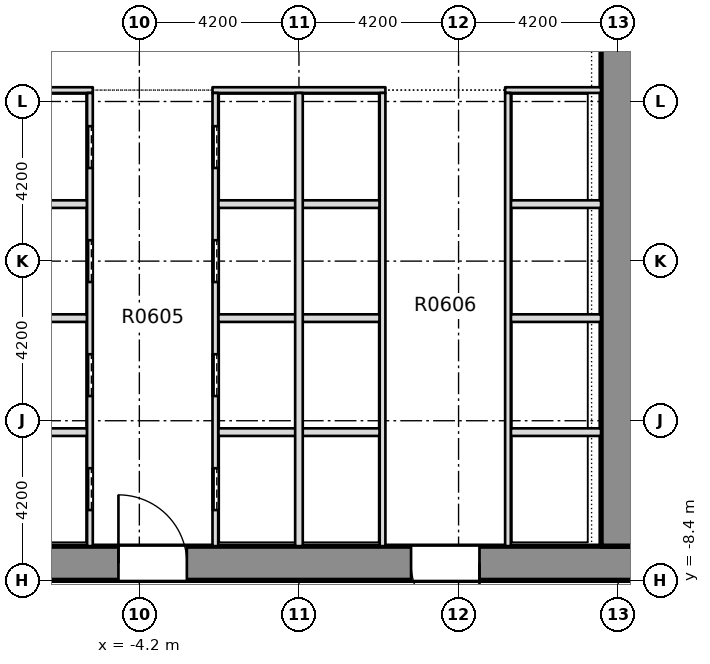
"""IFC4 building model, lengths in metres.
Left out: names, types, materials, properties, quantities, classifications, styles, units other than length and angle.
Written with IfcOpenShell. Run it as: python <this file> out.ifc"""

import sys

from ifc_helpers import new_model, si_unit, direction, frame, frame_2d, origin, place, context, subcontext, project, spatial, rectangle, extrude, element, fill, save


model = new_model("IFC4")
c1 = context("Model", 3, precision=1e-05, world=origin(), true_north=direction((0.0, 1.0)))
c2 = subcontext(c1, "Body", "Model", "MODEL_VIEW")
j1 = project(units=[si_unit("LENGTHUNIT", "METRE"), si_unit("PLANEANGLEUNIT", "RADIAN")], contexts=[c1])
p1 = place(None, origin())
s1 = spatial("IfcSite", under=j1, at=p1, CompositionType="ELEMENT")
p2 = place(p1, origin())
s2 = spatial("IfcBuilding", under=s1, at=p2, CompositionType="ELEMENT")
p3 = place(p2, frame((0.0, 0.0, 34.5)))
s3 = spatial("IfcBuildingStorey", under=s2, at=p3, CompositionType="ELEMENT", Elevation=34.5)
p4 = place(p3, frame((-11.7, -7.95, -0.32), z_axis=(0.0, 0.0, 1.0), x_axis=(1.0, 0.0, 0.0)))
e1 = element("IfcWall", 1, at=p4, inside=s3, PredefinedType="SHEAR", context=c2, shape_type="SweptSolid", body=[
    extrude(rectangle(XDim=23.4, YDim=0.9, at=frame_2d((11.7, 0.0))), origin(), (0.0, 0.0, 1.0), 3.45),
])
p5 = place(p4, frame((6.95, 0.0, 0.32)))
e2 = element("IfcOpeningElement", 2, at=p5, cuts=e1, PredefinedType="OPENING", context=c2, shape_type="SweptSolid", body=[
    extrude(rectangle(XDim=1.8, YDim=2.1, at=frame_2d((0.9, 1.05))), frame((0.0, 0.46, 0.0), z_axis=(0.0, -1.0, 0.0), x_axis=(1.0, 0.0, 0.0)), (0.0, 0.0, 1.0), 0.92),
])
p6 = place(p4, frame((14.65, 0.0, 0.32)))
e3 = element("IfcOpeningElement", 3, at=p6, cuts=e1, PredefinedType="OPENING", context=c2, shape_type="SweptSolid", body=[
    extrude(rectangle(XDim=1.8, YDim=2.1, at=frame_2d((0.9, 1.05))), frame((0.0, 0.46, 0.0), z_axis=(0.0, -1.0, 0.0), x_axis=(1.0, 0.0, 0.0)), (0.0, 0.0, 1.0), 0.92),
])
p7 = place(p3, frame((8.4, -7.5, -0.32), z_axis=(0.0, 0.0, 1.0), x_axis=(0.0, 1.0, 0.0)))
e4 = element("IfcWall", 4, at=p7, inside=s3, PredefinedType="SHEAR", context=c2, shape_type="SweptSolid", body=[
    extrude(rectangle(XDim=28.35, YDim=0.9, at=frame_2d((14.175, 0.0))), origin(), (0.0, 0.0, 1.0), 3.45),
])
p8 = place(p7, frame((18.4, 0.0, 0.32)))
e5 = element("IfcOpeningElement", 5, at=p8, cuts=e4, PredefinedType="OPENING", context=c2, shape_type="SweptSolid", body=[
    extrude(rectangle(XDim=1.2, YDim=2.1, at=frame_2d((0.6, 1.05))), frame((0.0, 0.46, 0.0), z_axis=(0.0, -1.0, 0.0), x_axis=(1.0, 0.0, 0.0)), (0.0, 0.0, 1.0), 0.92),
])
p9 = place(p3, frame((-7.949, -4.5, 0.0), z_axis=(0.0, 0.0, 1.0), x_axis=(1.0, 0.0, 0.0)))
e6 = element("IfcWall", 6, at=p9, inside=s3, PredefinedType="PARTITIONING", context=c2, shape_type="SweptSolid", body=[
    extrude(rectangle(XDim=2.374, YDim=0.2, at=frame_2d((1.187, 0.0))), origin(), (0.0, 0.0, 1.0), 3.13),
])
p10 = place(p3, frame((-2.125, -4.5, 0.0), z_axis=(0.0, 0.0, 1.0), x_axis=(1.0, 0.0, 0.0)))
e7 = element("IfcWall", 7, at=p10, inside=s3, PredefinedType="PARTITIONING", context=c2, shape_type="SweptSolid", body=[
    extrude(rectangle(XDim=4.25, YDim=0.2, at=frame_2d((2.125, 0.0))), origin(), (0.0, 0.0, 1.0), 3.13),
])
for number, where, z_axis, x_axis in (
    (8, (5.575, -4.5, 0.0), (0.0, 0.0, 1.0), (1.0, 0.0, 0.0)),
    (9, (-7.949, -1.5, 0.0), (0.0, 0.0, 1.0), (1.0, 0.0, 0.0)),
):
    element("IfcWall", number, at=place(p3, frame(where, z_axis=z_axis, x_axis=x_axis)), inside=s3, PredefinedType="PARTITIONING", context=c2, shape_type="SweptSolid", body=[
        extrude(rectangle(XDim=2.374, YDim=0.2, at=frame_2d((1.187, 0.0))), origin(), (0.0, 0.0, 1.0), 3.13),
    ])
p11 = place(p3, frame((-2.125, -1.5, 0.0), z_axis=(0.0, 0.0, 1.0), x_axis=(1.0, 0.0, 0.0)))
e10 = element("IfcWall", 10, at=p11, inside=s3, PredefinedType="PARTITIONING", context=c2, shape_type="SweptSolid", body=[
    extrude(rectangle(XDim=4.25, YDim=0.2, at=frame_2d((2.125, 0.0))), origin(), (0.0, 0.0, 1.0), 3.13),
])
for number, where, z_axis, x_axis in (
    (11, (5.575, -1.5, 0.0), (0.0, 0.0, 1.0), (1.0, 0.0, 0.0)),
    (12, (-7.949, 1.5, 0.0), (0.0, 0.0, 1.0), (1.0, 0.0, 0.0)),
):
    element("IfcWall", number, at=place(p3, frame(where, z_axis=z_axis, x_axis=x_axis)), inside=s3, PredefinedType="PARTITIONING", context=c2, shape_type="SweptSolid", body=[
        extrude(rectangle(XDim=2.374, YDim=0.2, at=frame_2d((1.187, 0.0))), origin(), (0.0, 0.0, 1.0), 3.13),
    ])
p12 = place(p3, frame((-2.125, 1.5, 0.0), z_axis=(0.0, 0.0, 1.0), x_axis=(1.0, 0.0, 0.0)))
e13 = element("IfcWall", 13, at=p12, inside=s3, PredefinedType="PARTITIONING", context=c2, shape_type="SweptSolid", body=[
    extrude(rectangle(XDim=4.25, YDim=0.2, at=frame_2d((2.125, 0.0))), origin(), (0.0, 0.0, 1.0), 3.13),
])
p13 = place(p3, frame((5.575, 1.5, 0.0), z_axis=(0.0, 0.0, 1.0), x_axis=(1.0, 0.0, 0.0)))
e14 = element("IfcWall", 14, at=p13, inside=s3, PredefinedType="PARTITIONING", context=c2, shape_type="SweptSolid", body=[
    extrude(rectangle(XDim=2.374, YDim=0.2, at=frame_2d((1.187, 0.0))), origin(), (0.0, 0.0, 1.0), 3.13),
])
p14 = place(p3, frame((-7.949, 4.5, 0.0), z_axis=(0.0, 0.0, 1.0), x_axis=(1.0, 0.0, 0.0)))
e15 = element("IfcWall", 15, at=p14, inside=s3, PredefinedType="PARTITIONING", context=c2, shape_type="SweptSolid", body=[
    extrude(rectangle(XDim=2.524, YDim=0.15, at=frame_2d((1.262, 0.0))), origin(), (0.0, 0.0, 1.0), 3.13),
])
p15 = place(p3, frame((-2.275, 4.5, 0.0), z_axis=(0.0, 0.0, 1.0), x_axis=(1.0, 0.0, 0.0)))
e16 = element("IfcWall", 16, at=p15, inside=s3, PredefinedType="PARTITIONING", context=c2, shape_type="SweptSolid", body=[
    extrude(rectangle(XDim=4.55, YDim=0.15, at=frame_2d((2.275, 0.0))), origin(), (0.0, 0.0, 1.0), 3.13),
])
p16 = place(p3, frame((5.425, 4.5, 0.0), z_axis=(0.0, 0.0, 1.0), x_axis=(1.0, 0.0, 0.0)))
e17 = element("IfcWall", 17, at=p16, inside=s3, PredefinedType="PARTITIONING", context=c2, shape_type="SweptSolid", body=[
    extrude(rectangle(XDim=2.524, YDim=0.15, at=frame_2d((1.262, 0.0))), origin(), (0.0, 0.0, 1.0), 3.13),
])
p17 = place(p3, frame((-5.5, -7.499, 0.0), z_axis=(0.0, 0.0, 1.0), x_axis=(0.0, 1.0, 0.0)))
e18 = element("IfcWall", 18, at=p17, inside=s3, PredefinedType="PARTITIONING", context=c2, shape_type="SweptSolid", body=[
    extrude(rectangle(XDim=11.924, YDim=0.15, at=frame_2d((5.962, 0.0))), origin(), (0.0, 0.0, 1.0), 3.13),
])
p18 = place(p17, frame((0.949, 0.0, 0.0)))
e19 = element("IfcOpeningElement", 19, at=p18, cuts=e18, PredefinedType="OPENING", context=c2, shape_type="SweptSolid", body=[
    extrude(rectangle(XDim=1.1, YDim=2.1, at=frame_2d((0.55, 1.05))), frame((0.0, 0.085, 0.0), z_axis=(0.0, -1.0, 0.0), x_axis=(1.0, 0.0, 0.0)), (0.0, 0.0, 1.0), 0.17),
])
p19 = place(p17, frame((3.949, 0.0, 0.0)))
e20 = element("IfcOpeningElement", 20, at=p19, cuts=e18, PredefinedType="OPENING", context=c2, shape_type="SweptSolid", body=[
    extrude(rectangle(XDim=1.1, YDim=2.1, at=frame_2d((0.55, 1.05))), frame((0.0, 0.085, 0.0), z_axis=(0.0, -1.0, 0.0), x_axis=(1.0, 0.0, 0.0)), (0.0, 0.0, 1.0), 0.17),
])
p20 = place(p17, frame((6.949, 0.0, 0.0)))
e21 = element("IfcOpeningElement", 21, at=p20, cuts=e18, PredefinedType="OPENING", context=c2, shape_type="SweptSolid", body=[
    extrude(rectangle(XDim=1.1, YDim=2.1, at=frame_2d((0.55, 1.05))), frame((0.0, 0.085, 0.0), z_axis=(0.0, -1.0, 0.0), x_axis=(1.0, 0.0, 0.0)), (0.0, 0.0, 1.0), 0.17),
])
p21 = place(p17, frame((9.949, 0.0, 0.0)))
e22 = element("IfcOpeningElement", 22, at=p21, cuts=e18, PredefinedType="OPENING", context=c2, shape_type="SweptSolid", body=[
    extrude(rectangle(XDim=1.1, YDim=2.1, at=frame_2d((0.55, 1.05))), frame((0.0, 0.085, 0.0), z_axis=(0.0, -1.0, 0.0), x_axis=(1.0, 0.0, 0.0)), (0.0, 0.0, 1.0), 0.17),
])
p22 = place(p3, frame((-2.2, -7.499, 0.0), z_axis=(0.0, 0.0, 1.0), x_axis=(0.0, 1.0, 0.0)))
e23 = element("IfcWall", 23, at=p22, inside=s3, PredefinedType="PARTITIONING", context=c2, shape_type="SweptSolid", body=[
    extrude(rectangle(XDim=11.924, YDim=0.15, at=frame_2d((5.962, 0.0))), origin(), (0.0, 0.0, 1.0), 3.13),
])
p23 = place(p22, frame((0.949, 0.0, 0.0)))
e24 = element("IfcOpeningElement", 24, at=p23, cuts=e23, PredefinedType="OPENING", context=c2, shape_type="SweptSolid", body=[
    extrude(rectangle(XDim=1.1, YDim=2.1, at=frame_2d((0.55, 1.05))), frame((0.0, 0.085, 0.0), z_axis=(0.0, -1.0, 0.0), x_axis=(1.0, 0.0, 0.0)), (0.0, 0.0, 1.0), 0.17),
])
p24 = place(p22, frame((3.949, 0.0, 0.0)))
e25 = element("IfcOpeningElement", 25, at=p24, cuts=e23, PredefinedType="OPENING", context=c2, shape_type="SweptSolid", body=[
    extrude(rectangle(XDim=1.1, YDim=2.1, at=frame_2d((0.55, 1.05))), frame((0.0, 0.085, 0.0), z_axis=(0.0, -1.0, 0.0), x_axis=(1.0, 0.0, 0.0)), (0.0, 0.0, 1.0), 0.17),
])
p25 = place(p22, frame((6.949, 0.0, 0.0)))
e26 = element("IfcOpeningElement", 26, at=p25, cuts=e23, PredefinedType="OPENING", context=c2, shape_type="SweptSolid", body=[
    extrude(rectangle(XDim=1.1, YDim=2.1, at=frame_2d((0.55, 1.05))), frame((0.0, 0.085, 0.0), z_axis=(0.0, -1.0, 0.0), x_axis=(1.0, 0.0, 0.0)), (0.0, 0.0, 1.0), 0.17),
])
p26 = place(p22, frame((9.949, 0.0, 0.0)))
e27 = element("IfcOpeningElement", 27, at=p26, cuts=e23, PredefinedType="OPENING", context=c2, shape_type="SweptSolid", body=[
    extrude(rectangle(XDim=1.1, YDim=2.1, at=frame_2d((0.55, 1.05))), frame((0.0, 0.085, 0.0), z_axis=(0.0, -1.0, 0.0), x_axis=(1.0, 0.0, 0.0)), (0.0, 0.0, 1.0), 0.17),
])
p27 = place(p3, frame((0.0, -7.499, 0.0), z_axis=(0.0, 0.0, 1.0), x_axis=(0.0, 1.0, 0.0)))
e28 = element("IfcWall", 28, at=p27, inside=s3, PredefinedType="PARTITIONING", context=c2, shape_type="SweptSolid", body=[
    extrude(rectangle(XDim=11.924, YDim=0.2, at=frame_2d((5.962, 0.0))), origin(), (0.0, 0.0, 1.0), 3.13),
])
for number, where, z_axis, x_axis in (
    (29, (2.2, -7.499, 0.0), (0.0, 0.0, 1.0), (0.0, 1.0, 0.0)),
    (30, (5.5, -7.499, 0.0), (0.0, 0.0, 1.0), (0.0, 1.0, 0.0)),
):
    element("IfcWall", number, at=place(p3, frame(where, z_axis=z_axis, x_axis=x_axis)), inside=s3, PredefinedType="PARTITIONING", context=c2, shape_type="SweptSolid", body=[
        extrude(rectangle(XDim=11.924, YDim=0.15, at=frame_2d((5.962, 0.0))), origin(), (0.0, 0.0, 1.0), 3.13),
    ])
p28 = place(p18, origin())
e31 = element("IfcDoor", 31, at=p28, inside=s3, OperationType="SLIDING_TO_RIGHT", PredefinedType="DOOR", context=c2, shape_type="SweptSolid", body=[
    extrude(rectangle(XDim=1.1, YDim=2.1, at=frame_2d((0.55, 1.05))), frame((0.0, 0.025, 0.0), z_axis=(0.0, -1.0, 0.0), x_axis=(1.0, 0.0, 0.0)), (0.0, 0.0, 1.0), 0.05),
])
fill(e19, e31)
p29 = place(p19, origin())
e32 = element("IfcDoor", 32, at=p29, inside=s3, OperationType="SLIDING_TO_RIGHT", PredefinedType="DOOR", context=c2, shape_type="SweptSolid", body=[
    extrude(rectangle(XDim=1.1, YDim=2.1, at=frame_2d((0.55, 1.05))), frame((0.0, 0.025, 0.0), z_axis=(0.0, -1.0, 0.0), x_axis=(1.0, 0.0, 0.0)), (0.0, 0.0, 1.0), 0.05),
])
fill(e20, e32)
p30 = place(p20, origin())
e33 = element("IfcDoor", 33, at=p30, inside=s3, OperationType="SLIDING_TO_RIGHT", PredefinedType="DOOR", context=c2, shape_type="SweptSolid", body=[
    extrude(rectangle(XDim=1.1, YDim=2.1, at=frame_2d((0.55, 1.05))), frame((0.0, 0.025, 0.0), z_axis=(0.0, -1.0, 0.0), x_axis=(1.0, 0.0, 0.0)), (0.0, 0.0, 1.0), 0.05),
])
fill(e21, e33)
p31 = place(p21, origin())
e34 = element("IfcDoor", 34, at=p31, inside=s3, OperationType="SLIDING_TO_RIGHT", PredefinedType="DOOR", context=c2, shape_type="SweptSolid", body=[
    extrude(rectangle(XDim=1.1, YDim=2.1, at=frame_2d((0.55, 1.05))), frame((0.0, 0.025, 0.0), z_axis=(0.0, -1.0, 0.0), x_axis=(1.0, 0.0, 0.0)), (0.0, 0.0, 1.0), 0.05),
])
fill(e22, e34)
p32 = place(p23, origin())
e35 = element("IfcDoor", 35, at=p32, inside=s3, OperationType="SLIDING_TO_RIGHT", PredefinedType="DOOR", context=c2, shape_type="SweptSolid", body=[
    extrude(rectangle(XDim=1.1, YDim=2.1, at=frame_2d((0.55, 1.05))), frame((0.0, 0.025, 0.0), z_axis=(0.0, -1.0, 0.0), x_axis=(1.0, 0.0, 0.0)), (0.0, 0.0, 1.0), 0.05),
])
fill(e24, e35)
p33 = place(p24, origin())
e36 = element("IfcDoor", 36, at=p33, inside=s3, OperationType="SLIDING_TO_RIGHT", PredefinedType="DOOR", context=c2, shape_type="SweptSolid", body=[
    extrude(rectangle(XDim=1.1, YDim=2.1, at=frame_2d((0.55, 1.05))), frame((0.0, 0.025, 0.0), z_axis=(0.0, -1.0, 0.0), x_axis=(1.0, 0.0, 0.0)), (0.0, 0.0, 1.0), 0.05),
])
fill(e25, e36)
p34 = place(p25, origin())
e37 = element("IfcDoor", 37, at=p34, inside=s3, OperationType="SLIDING_TO_RIGHT", PredefinedType="DOOR", context=c2, shape_type="SweptSolid", body=[
    extrude(rectangle(XDim=1.1, YDim=2.1, at=frame_2d((0.55, 1.05))), frame((0.0, 0.025, 0.0), z_axis=(0.0, -1.0, 0.0), x_axis=(1.0, 0.0, 0.0)), (0.0, 0.0, 1.0), 0.05),
])
fill(e26, e37)
p35 = place(p26, origin())
e38 = element("IfcDoor", 38, at=p35, inside=s3, OperationType="SLIDING_TO_RIGHT", PredefinedType="DOOR", context=c2, shape_type="SweptSolid", body=[
    extrude(rectangle(XDim=1.1, YDim=2.1, at=frame_2d((0.55, 1.05))), frame((0.0, 0.025, 0.0), z_axis=(0.0, -1.0, 0.0), x_axis=(1.0, 0.0, 0.0)), (0.0, 0.0, 1.0), 0.05),
])
fill(e27, e38)
p36 = place(p5, origin())
e39 = element("IfcDoor", 39, at=p36, inside=s3, OperationType="SINGLE_SWING_LEFT", PredefinedType="DOOR", context=c2, shape_type="SweptSolid", body=[
    extrude(rectangle(XDim=1.8, YDim=2.1, at=frame_2d((0.9, 1.05))), frame((0.0, 0.025, 0.0), z_axis=(0.0, -1.0, 0.0), x_axis=(1.0, 0.0, 0.0)), (0.0, 0.0, 1.0), 0.05),
])
fill(e2, e39)
p37 = place(p6, origin())
e40 = element("IfcDoor", 40, at=p37, inside=s3, OperationType="SINGLE_SWING_LEFT", PredefinedType="DOOR", context=c2, shape_type="SweptSolid", body=[
    extrude(rectangle(XDim=1.8, YDim=2.1, at=frame_2d((0.9, 1.05))), frame((0.0, 0.025, 0.0), z_axis=(0.0, -1.0, 0.0), x_axis=(1.0, 0.0, 0.0)), (0.0, 0.0, 1.0), 0.05),
])
fill(e3, e40)
save(model, sys.argv[1])
